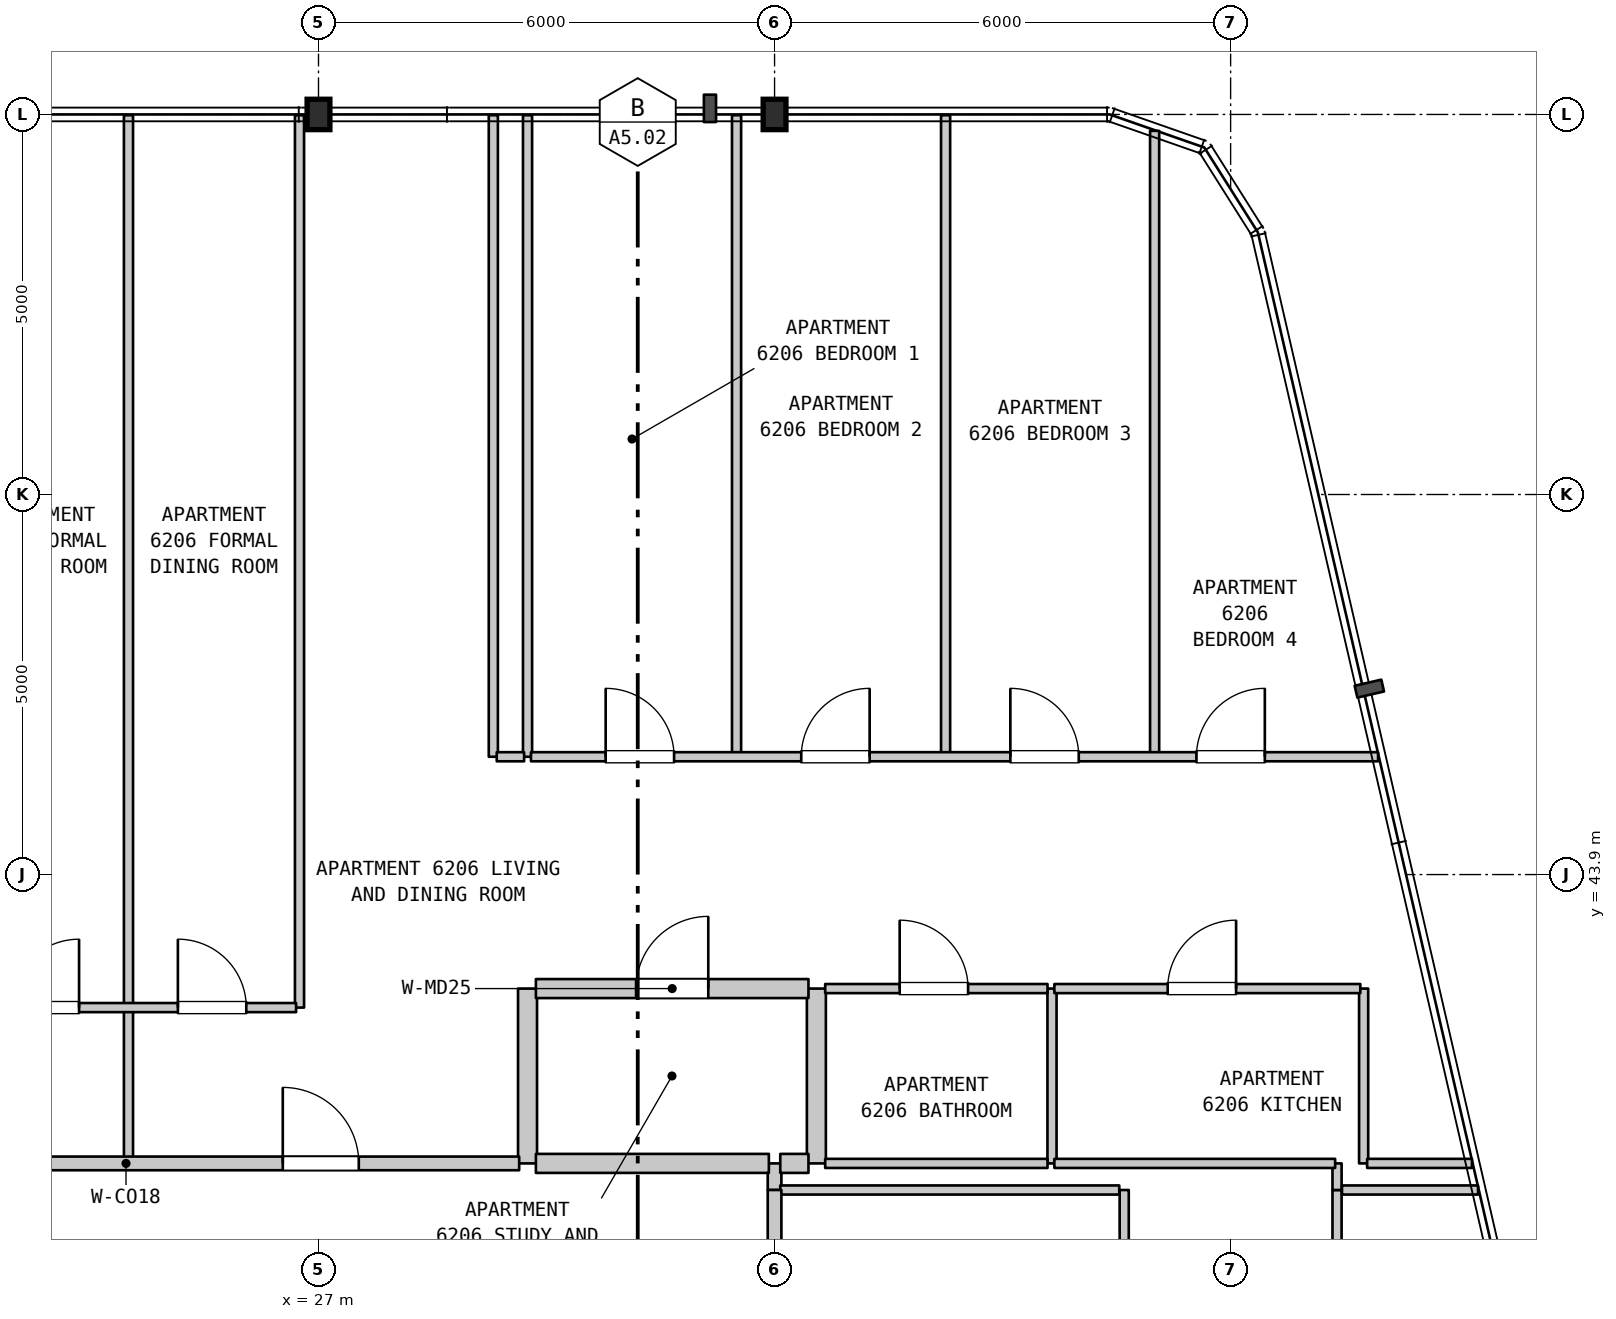
"""IFC4 building model, lengths in metres.
Left out: names, types, materials, properties, quantities, classifications, styles, units other than length and angle.
Written with IfcOpenShell. Run it as: python <this file> out.ifc"""

import sys

from ifc_helpers import new_model, si_unit, direction, frame, frame_2d, origin, origin_2d, place, context, subcontext, project, spatial, rectangle, i_section, extrude, element, fill, save


model = new_model("IFC4")
c1 = context("Model", 3, precision=1e-05, world=origin(), true_north=direction((0.0, 1.0)))
c2 = subcontext(c1, "Body", "Model", "MODEL_VIEW")
j1 = project(units=[si_unit("LENGTHUNIT", "METRE"), si_unit("PLANEANGLEUNIT", "RADIAN")], contexts=[c1])
p1 = place(None, origin())
s1 = spatial("IfcSite", under=j1, at=p1, CompositionType="ELEMENT")
p2 = place(p1, origin())
s2 = spatial("IfcBuilding", under=s1, at=p2, CompositionType="ELEMENT")
p3 = place(p2, frame((0.0, 0.0, 251.0)))
s3 = spatial("IfcBuildingStorey", under=s2, at=p3, CompositionType="ELEMENT", Elevation=251.0)
for number, where, z_axis, x_axis in (
    (1, (27.0, 53.9, 0.0), (0.0, 0.0, 1.0), (1.0, 0.0, 0.0)),
    (2, (33.0, 53.9, 0.0), (0.0, 0.0, 1.0), (1.0, 0.0, 0.0)),
):
    element("IfcColumn", number, at=place(p3, frame(where, z_axis=z_axis, x_axis=x_axis)), inside=s3, PredefinedType="COLUMN", context=c2, shape_type="SweptSolid", body=[
        extrude(i_section(OverallWidth=0.3, OverallDepth=0.4, WebThickness=0.013, FlangeThickness=0.024, FilletRadius=0.027, at=origin_2d()), origin(), (0.0, 0.0, 1.0), 3.7),
    ])
p4 = place(p3, frame((24.5, 40.1, 0.0), z_axis=(0.0, 0.0, 1.0), x_axis=(0.0, 1.0, 0.0)))
e3 = element("IfcWall", 3, at=p4, inside=s3, PredefinedType="PARTITIONING", context=c2, shape_type="SweptSolid", body=[
    extrude(rectangle(XDim=2.05, YDim=0.12, at=frame_2d((1.025, 0.0))), origin(), (0.0, 0.0, 1.0), 3.39),
])
for number, where, z_axis, x_axis in (
    (4, (24.5, 42.15, 0.0), (0.0, 0.0, 1.0), (0.0, 1.0, 0.0)),
    (5, (26.75, 42.15, 0.0), (0.0, 0.0, 1.0), (0.0, 1.0, 0.0)),
):
    element("IfcWall", number, at=place(p3, frame(where, z_axis=z_axis, x_axis=x_axis)), inside=s3, PredefinedType="PARTITIONING", context=c2, shape_type="SweptSolid", body=[
        extrude(rectangle(XDim=11.74, YDim=0.12, at=frame_2d((5.87, 0.0))), origin(), (0.0, 0.0, 1.0), 3.39),
    ])
p5 = place(p3, frame((29.3, 45.45, 0.0), z_axis=(0.0, 0.0, 1.0), x_axis=(0.0, 1.0, 0.0)))
e6 = element("IfcWall", 6, at=p5, inside=s3, PredefinedType="PARTITIONING", context=c2, shape_type="SweptSolid", body=[
    extrude(rectangle(XDim=8.44, YDim=0.12, at=frame_2d((4.22, 0.0))), origin(), (0.0, 0.0, 1.0), 3.39),
])
p6 = place(p3, frame((29.75, 40.1, 0.0), z_axis=(0.0, 0.0, 1.0), x_axis=(0.0, 1.0, 0.0)))
e7 = element("IfcWall", 7, at=p6, inside=s3, PredefinedType="STANDARD", context=c2, shape_type="SweptSolid", body=[
    extrude(rectangle(XDim=2.3, YDim=0.25, at=frame_2d((1.15, 0.0))), origin(), (0.0, 0.0, 1.0), 3.39),
])
for number, where, z_axis, x_axis in (
    (8, (29.75, 45.45, 0.0), (0.0, 0.0, 1.0), (0.0, 1.0, 0.0)),
    (9, (32.5, 45.45, 0.0), (0.0, 0.0, 1.0), (0.0, 1.0, 0.0)),
):
    element("IfcWall", number, at=place(p3, frame(where, z_axis=z_axis, x_axis=x_axis)), inside=s3, PredefinedType="PARTITIONING", context=c2, shape_type="SweptSolid", body=[
        extrude(rectangle(XDim=8.44, YDim=0.12, at=frame_2d((4.22, 0.0))), origin(), (0.0, 0.0, 1.0), 3.39),
    ])
p7 = place(p3, frame((33.0, 39.75, 0.0), z_axis=(0.0, 0.0, 1.0), x_axis=(0.0, 1.0, 0.0)))
e10 = element("IfcWall", 10, at=p7, inside=s3, PredefinedType="STANDARD", context=c2, shape_type="SweptSolid", body=[
    extrude(rectangle(XDim=0.35, YDim=0.18, at=frame_2d((0.175, 0.0))), origin(), (0.0, 0.0, 1.0), 3.39),
])
p8 = place(p3, frame((33.55, 40.1, 0.0), z_axis=(0.0, 0.0, 1.0), x_axis=(0.0, 1.0, 0.0)))
e11 = element("IfcWall", 11, at=p8, inside=s3, PredefinedType="STANDARD", context=c2, shape_type="SweptSolid", body=[
    extrude(rectangle(XDim=2.3, YDim=0.25, at=frame_2d((1.15, 0.0))), origin(), (0.0, 0.0, 1.0), 3.39),
])
p9 = place(p3, frame((35.25, 45.45, 0.0), z_axis=(0.0, 0.0, 1.0), x_axis=(0.0, 1.0, 0.0)))
e12 = element("IfcWall", 12, at=p9, inside=s3, PredefinedType="PARTITIONING", context=c2, shape_type="SweptSolid", body=[
    extrude(rectangle(XDim=8.44, YDim=0.12, at=frame_2d((4.22, 0.0))), origin(), (0.0, 0.0, 1.0), 3.39),
])
p10 = place(p3, frame((36.65, 40.1, 0.0), z_axis=(0.0, 0.0, 1.0), x_axis=(0.0, 1.0, 0.0)))
e13 = element("IfcWall", 13, at=p10, inside=s3, PredefinedType="PARTITIONING", context=c2, shape_type="SweptSolid", body=[
    extrude(rectangle(XDim=2.3, YDim=0.12, at=frame_2d((1.15, 0.0))), origin(), (0.0, 0.0, 1.0), 3.39),
])
p11 = place(p3, frame((37.6, 36.366, 0.0), z_axis=(0.0, 0.0, 1.0), x_axis=(0.0, 1.0, 0.0)))
e14 = element("IfcWall", 14, at=p11, inside=s3, PredefinedType="PARTITIONING", context=c2, shape_type="SweptSolid", body=[
    extrude(rectangle(XDim=3.384, YDim=0.12, at=frame_2d((1.692, 0.0))), origin(), (0.0, 0.0, 1.0), 3.39),
])
p12 = place(p11, frame((1.242, 0.0, 0.0)))
e15 = element("IfcOpeningElement", 15, at=p12, cuts=e14, PredefinedType="OPENING", context=c2, shape_type="SweptSolid", body=[
    extrude(rectangle(XDim=0.9, YDim=2.1, at=frame_2d((0.45, 1.05))), frame((0.0, 0.07, 0.0), z_axis=(0.0, -1.0, 0.0), x_axis=(1.0, 0.0, 0.0)), (0.0, 0.0, 1.0), 0.14),
])
p13 = place(p3, frame((38.0, 45.45, 0.0), z_axis=(0.0, 0.0, 1.0), x_axis=(0.0, 1.0, 0.0)))
e16 = element("IfcWall", 16, at=p13, inside=s3, PredefinedType="PARTITIONING", context=c2, shape_type="SweptSolid", body=[
    extrude(rectangle(XDim=8.234, YDim=0.12, at=frame_2d((4.117, 0.0))), origin(), (0.0, 0.0, 1.0), 3.39),
])
p14 = place(p3, frame((40.4, 32.7, 0.0), z_axis=(0.0, 0.0, 1.0), x_axis=(0.0, 1.0, 0.0)))
e17 = element("IfcWall", 17, at=p14, inside=s3, PredefinedType="PARTITIONING", context=c2, shape_type="SweptSolid", body=[
    extrude(rectangle(XDim=7.05, YDim=0.12, at=frame_2d((3.525, 0.0))), origin(), (0.0, 0.0, 1.0), 3.39),
])
p15 = place(p14, frame((3.004, 0.0, 0.0)))
e18 = element("IfcOpeningElement", 18, at=p15, cuts=e17, PredefinedType="OPENING", context=c2, shape_type="SweptSolid", body=[
    extrude(rectangle(XDim=0.9, YDim=2.15, at=frame_2d((0.45, 1.075))), frame((0.0, 0.07, 0.0), z_axis=(0.0, -1.0, 0.0), x_axis=(1.0, 0.0, 0.0)), (0.0, 0.0, 1.0), 0.14),
])
p16 = place(p3, frame((40.4, 39.75, 0.0), z_axis=(0.0, 0.0, 1.0), x_axis=(0.0, 1.0, 0.0)))
e19 = element("IfcWall", 19, at=p16, inside=s3, PredefinedType="PARTITIONING", context=c2, shape_type="SweptSolid", body=[
    extrude(rectangle(XDim=0.35, YDim=0.12, at=frame_2d((0.175, 0.0))), origin(), (0.0, 0.0, 1.0), 3.39),
])
p17 = place(p3, frame((40.75, 40.1, 0.0), z_axis=(0.0, 0.0, 1.0), x_axis=(0.0, 1.0, 0.0)))
e20 = element("IfcWall", 20, at=p17, inside=s3, PredefinedType="PARTITIONING", context=c2, shape_type="SweptSolid", body=[
    extrude(rectangle(XDim=2.3, YDim=0.12, at=frame_2d((1.15, 0.0))), origin(), (0.0, 0.0, 1.0), 3.39),
])
p18 = place(p3, frame((33.075, 39.75, 0.0), z_axis=(0.0, 0.0, 1.0), x_axis=(1.0, 0.0, 0.0)))
e21 = element("IfcWall", 21, at=p18, inside=s3, PredefinedType="PARTITIONING", context=c2, shape_type="SweptSolid", body=[
    extrude(rectangle(XDim=4.46, YDim=0.12, at=frame_2d((2.23, 0.0))), origin(), (0.0, 0.0, 1.0), 3.39),
])
p19 = place(p3, frame((40.465, 39.75, 0.0), z_axis=(0.0, 0.0, 1.0), x_axis=(1.0, 0.0, 0.0)))
e22 = element("IfcWall", 22, at=p19, inside=s3, PredefinedType="PARTITIONING", context=c2, shape_type="SweptSolid", body=[
    extrude(rectangle(XDim=1.79, YDim=0.12, at=frame_2d((0.895, 0.0))), origin(), (0.0, 0.0, 1.0), 3.39),
])
p20 = place(p3, frame((19.295, 40.1, 0.0), z_axis=(0.0, 0.0, 1.0), x_axis=(1.0, 0.0, 0.0)))
e23 = element("IfcWall", 23, at=p20, inside=s3, PredefinedType="STANDARD", context=c2, shape_type="SweptSolid", body=[
    extrude(rectangle(XDim=10.345, YDim=0.18, at=frame_2d((5.172, 0.0))), origin(), (0.0, 0.0, 1.0), 3.39),
])
p21 = place(p20, frame((2.035, 0.0, 0.0)))
e24 = element("IfcOpeningElement", 24, at=p21, cuts=e23, PredefinedType="OPENING", context=c2, shape_type="SweptSolid", body=[
    extrude(rectangle(XDim=1.0, YDim=2.15, at=frame_2d((0.5, 1.075))), frame((0.0, 0.1, 0.0), z_axis=(0.0, -1.0, 0.0), x_axis=(1.0, 0.0, 0.0)), (0.0, 0.0, 1.0), 0.2),
])
p22 = place(p20, frame((7.235, 0.0, 0.0)))
e25 = element("IfcOpeningElement", 25, at=p22, cuts=e23, PredefinedType="OPENING", context=c2, shape_type="SweptSolid", body=[
    extrude(rectangle(XDim=1.0, YDim=2.15, at=frame_2d((0.5, 1.075))), frame((0.0, 0.1, 0.0), z_axis=(0.0, -1.0, 0.0), x_axis=(1.0, 0.0, 0.0)), (0.0, 0.0, 1.0), 0.2),
])
p23 = place(p3, frame((29.86, 40.1, 0.0), z_axis=(0.0, 0.0, 1.0), x_axis=(1.0, 0.0, 0.0)))
e26 = element("IfcWall", 26, at=p23, inside=s3, PredefinedType="STANDARD", context=c2, shape_type="SweptSolid", body=[
    extrude(rectangle(XDim=3.065, YDim=0.25, at=frame_2d((1.532, 0.0))), origin(), (0.0, 0.0, 1.0), 3.39),
])
p24 = place(p3, frame((33.075, 40.1, 0.0), z_axis=(0.0, 0.0, 1.0), x_axis=(1.0, 0.0, 0.0)))
e27 = element("IfcWall", 27, at=p24, inside=s3, PredefinedType="STANDARD", context=c2, shape_type="SweptSolid", body=[
    extrude(rectangle(XDim=0.371, YDim=0.25, at=frame_2d((0.186, 0.0))), origin(), (0.0, 0.0, 1.0), 3.39),
])
p25 = place(p3, frame((33.666, 40.1, 0.0), z_axis=(0.0, 0.0, 1.0), x_axis=(1.0, 0.0, 0.0)))
e28 = element("IfcWall", 28, at=p25, inside=s3, PredefinedType="PARTITIONING", context=c2, shape_type="SweptSolid", body=[
    extrude(rectangle(XDim=2.925, YDim=0.12, at=frame_2d((1.462, 0.0))), origin(), (0.0, 0.0, 1.0), 3.39),
])
p26 = place(p3, frame((36.681, 40.1, 0.0), z_axis=(0.0, 0.0, 1.0), x_axis=(1.0, 0.0, 0.0)))
e29 = element("IfcWall", 29, at=p26, inside=s3, PredefinedType="PARTITIONING", context=c2, shape_type="SweptSolid", body=[
    extrude(rectangle(XDim=3.694, YDim=0.12, at=frame_2d((1.847, 0.0))), origin(), (0.0, 0.0, 1.0), 3.39),
])
p27 = place(p3, frame((40.796, 40.1, 0.0), z_axis=(0.0, 0.0, 1.0), x_axis=(1.0, 0.0, 0.0)))
e30 = element("IfcWall", 30, at=p27, inside=s3, PredefinedType="PARTITIONING", context=c2, shape_type="SweptSolid", body=[
    extrude(rectangle(XDim=1.379, YDim=0.12, at=frame_2d((0.689, 0.0))), origin(), (0.0, 0.0, 1.0), 3.39),
])
p28 = place(p3, frame((22.295, 42.15, 0.0), z_axis=(0.0, 0.0, 1.0), x_axis=(1.0, 0.0, 0.0)))
e31 = element("IfcWall", 31, at=p28, inside=s3, PredefinedType="PARTITIONING", context=c2, shape_type="SweptSolid", body=[
    extrude(rectangle(XDim=4.41, YDim=0.12, at=frame_2d((2.205, 0.0))), origin(), (0.0, 0.0, 1.0), 3.39),
])
p29 = place(p28, frame((0.655, 0.0, 0.0)))
e32 = element("IfcOpeningElement", 32, at=p29, cuts=e31, PredefinedType="OPENING", context=c2, shape_type="SweptSolid", body=[
    extrude(rectangle(XDim=0.9, YDim=2.15, at=frame_2d((0.45, 1.075))), frame((0.0, 0.07, 0.0), z_axis=(0.0, -1.0, 0.0), x_axis=(1.0, 0.0, 0.0)), (0.0, 0.0, 1.0), 0.14),
])
p30 = place(p28, frame((2.855, 0.0, 0.0)))
e33 = element("IfcOpeningElement", 33, at=p30, cuts=e31, PredefinedType="OPENING", context=c2, shape_type="SweptSolid", body=[
    extrude(rectangle(XDim=0.9, YDim=2.15, at=frame_2d((0.45, 1.075))), frame((0.0, 0.07, 0.0), z_axis=(0.0, -1.0, 0.0), x_axis=(1.0, 0.0, 0.0)), (0.0, 0.0, 1.0), 0.14),
])
p31 = place(p3, frame((29.86, 42.4, 0.0), z_axis=(0.0, 0.0, 1.0), x_axis=(1.0, 0.0, 0.0)))
e34 = element("IfcWall", 34, at=p31, inside=s3, PredefinedType="STANDARD", context=c2, shape_type="SweptSolid", body=[
    extrude(rectangle(XDim=3.586, YDim=0.25, at=frame_2d((1.793, 0.0))), origin(), (0.0, 0.0, 1.0), 3.39),
])
p32 = place(p31, frame((1.318, 0.0, 0.0)))
e35 = element("IfcOpeningElement", 35, at=p32, cuts=e34, PredefinedType="OPENING", context=c2, shape_type="SweptSolid", body=[
    extrude(rectangle(XDim=0.95, YDim=2.15, at=frame_2d((0.475, 1.075))), frame((0.0, 0.135, 0.0), z_axis=(0.0, -1.0, 0.0), x_axis=(1.0, 0.0, 0.0)), (0.0, 0.0, 1.0), 0.27),
])
p33 = place(p3, frame((33.666, 42.4, 0.0), z_axis=(0.0, 0.0, 1.0), x_axis=(1.0, 0.0, 0.0)))
e36 = element("IfcWall", 36, at=p33, inside=s3, PredefinedType="PARTITIONING", context=c2, shape_type="SweptSolid", body=[
    extrude(rectangle(XDim=2.925, YDim=0.12, at=frame_2d((1.462, 0.0))), origin(), (0.0, 0.0, 1.0), 3.39),
])
p34 = place(p33, frame((0.98, 0.0, 0.0)))
e37 = element("IfcOpeningElement", 37, at=p34, cuts=e36, PredefinedType="OPENING", context=c2, shape_type="SweptSolid", body=[
    extrude(rectangle(XDim=0.9, YDim=2.1, at=frame_2d((0.45, 1.05))), frame((0.0, 0.07, 0.0), z_axis=(0.0, -1.0, 0.0), x_axis=(1.0, 0.0, 0.0)), (0.0, 0.0, 1.0), 0.14),
])
p35 = place(p3, frame((36.681, 42.4, 0.0), z_axis=(0.0, 0.0, 1.0), x_axis=(1.0, 0.0, 0.0)))
e38 = element("IfcWall", 38, at=p35, inside=s3, PredefinedType="PARTITIONING", context=c2, shape_type="SweptSolid", body=[
    extrude(rectangle(XDim=4.025, YDim=0.12, at=frame_2d((2.013, 0.0))), origin(), (0.0, 0.0, 1.0), 3.39),
])
p36 = place(p35, frame((1.491, 0.0, 0.0)))
e39 = element("IfcOpeningElement", 39, at=p36, cuts=e38, PredefinedType="OPENING", context=c2, shape_type="SweptSolid", body=[
    extrude(rectangle(XDim=0.9, YDim=2.15, at=frame_2d((0.45, 1.075))), frame((0.0, 0.07, 0.0), z_axis=(0.0, -1.0, 0.0), x_axis=(1.0, 0.0, 0.0)), (0.0, 0.0, 1.0), 0.14),
])
p37 = place(p3, frame((29.345, 45.45, 0.0), z_axis=(0.0, 0.0, 1.0), x_axis=(1.0, 0.0, 0.0)))
e40 = element("IfcWall", 40, at=p37, inside=s3, PredefinedType="PARTITIONING", context=c2, shape_type="SweptSolid", body=[
    extrude(rectangle(XDim=0.36, YDim=0.12, at=frame_2d((0.18, 0.0))), origin(), (0.0, 0.0, 1.0), 3.39),
])
p38 = place(p3, frame((29.795, 45.45, 0.0), z_axis=(0.0, 0.0, 1.0), x_axis=(1.0, 0.0, 0.0)))
e41 = element("IfcWall", 41, at=p38, inside=s3, PredefinedType="PARTITIONING", context=c2, shape_type="SweptSolid", body=[
    extrude(rectangle(XDim=11.145, YDim=0.12, at=frame_2d((5.573, 0.0))), origin(), (0.0, 0.0, 1.0), 3.39),
])
p39 = place(p38, frame((0.983, 0.0, 0.0)))
e42 = element("IfcOpeningElement", 42, at=p39, cuts=e41, PredefinedType="OPENING", context=c2, shape_type="SweptSolid", body=[
    extrude(rectangle(XDim=0.9, YDim=2.15, at=frame_2d((0.45, 1.075))), frame((0.0, 0.07, 0.0), z_axis=(0.0, -1.0, 0.0), x_axis=(1.0, 0.0, 0.0)), (0.0, 0.0, 1.0), 0.14),
])
p40 = place(p38, frame((3.556, 0.0, 0.0)))
e43 = element("IfcOpeningElement", 43, at=p40, cuts=e41, PredefinedType="OPENING", context=c2, shape_type="SweptSolid", body=[
    extrude(rectangle(XDim=0.9, YDim=2.15, at=frame_2d((0.45, 1.075))), frame((0.0, 0.07, 0.0), z_axis=(0.0, -1.0, 0.0), x_axis=(1.0, 0.0, 0.0)), (0.0, 0.0, 1.0), 0.14),
])
p41 = place(p38, frame((6.307, 0.0, 0.0)))
e44 = element("IfcOpeningElement", 44, at=p41, cuts=e41, PredefinedType="OPENING", context=c2, shape_type="SweptSolid", body=[
    extrude(rectangle(XDim=0.9, YDim=2.15, at=frame_2d((0.45, 1.075))), frame((0.0, 0.07, 0.0), z_axis=(0.0, -1.0, 0.0), x_axis=(1.0, 0.0, 0.0)), (0.0, 0.0, 1.0), 0.14),
])
p42 = place(p38, frame((8.755, 0.0, 0.0)))
e45 = element("IfcOpeningElement", 45, at=p42, cuts=e41, PredefinedType="OPENING", context=c2, shape_type="SweptSolid", body=[
    extrude(rectangle(XDim=0.9, YDim=2.15, at=frame_2d((0.45, 1.075))), frame((0.0, 0.07, 0.0), z_axis=(0.0, -1.0, 0.0), x_axis=(1.0, 0.0, 0.0)), (0.0, 0.0, 1.0), 0.14),
])
p43 = place(p3, frame((33.0, 37.9, 0.0), z_axis=(0.0, 0.0, 1.0), x_axis=(0.0, 1.0, 0.0)))
e46 = element("IfcWall", 46, at=p43, inside=s3, PredefinedType="STANDARD", context=c2, shape_type="SweptSolid", body=[
    extrude(rectangle(XDim=1.85, YDim=0.18, at=frame_2d((0.925, 0.0))), origin(), (0.0, 0.0, 1.0), 2.79),
])
p44 = place(p22, origin())
e47 = element("IfcDoor", 47, at=p44, inside=s3, OperationType="SINGLE_SWING_LEFT", PredefinedType="DOOR", context=c2, shape_type="SweptSolid", body=[
    extrude(rectangle(XDim=1.0, YDim=2.15, at=frame_2d((0.5, 1.075))), frame((0.0, 0.025, 0.0), z_axis=(0.0, -1.0, 0.0), x_axis=(1.0, 0.0, 0.0)), (0.0, 0.0, 1.0), 0.05),
])
fill(e25, e47)
p45 = place(p29, origin())
e48 = element("IfcDoor", 48, at=p45, inside=s3, OperationType="SINGLE_SWING_RIGHT", PredefinedType="DOOR", context=c2, shape_type="SweptSolid", body=[
    extrude(rectangle(XDim=0.9, YDim=2.15, at=frame_2d((0.45, 1.075))), frame((0.0, 0.025, 0.0), z_axis=(0.0, -1.0, 0.0), x_axis=(1.0, 0.0, 0.0)), (0.0, 0.0, 1.0), 0.05),
])
fill(e32, e48)
p46 = place(p30, origin())
e49 = element("IfcDoor", 49, at=p46, inside=s3, OperationType="SINGLE_SWING_LEFT", PredefinedType="DOOR", context=c2, shape_type="SweptSolid", body=[
    extrude(rectangle(XDim=0.9, YDim=2.15, at=frame_2d((0.45, 1.075))), frame((0.0, 0.025, 0.0), z_axis=(0.0, -1.0, 0.0), x_axis=(1.0, 0.0, 0.0)), (0.0, 0.0, 1.0), 0.05),
])
fill(e33, e49)
p47 = place(p32, origin())
e50 = element("IfcDoor", 50, at=p47, inside=s3, OperationType="SINGLE_SWING_RIGHT", PredefinedType="DOOR", context=c2, shape_type="SweptSolid", body=[
    extrude(rectangle(XDim=0.95, YDim=2.15, at=frame_2d((0.475, 1.075))), frame((0.0, 0.025, 0.0), z_axis=(0.0, -1.0, 0.0), x_axis=(1.0, 0.0, 0.0)), (0.0, 0.0, 1.0), 0.05),
])
fill(e35, e50)
p48 = place(p34, origin())
e51 = element("IfcDoor", 51, at=p48, inside=s3, OperationType="SINGLE_SWING_LEFT", PredefinedType="DOOR", context=c2, shape_type="SweptSolid", body=[
    extrude(rectangle(XDim=0.9, YDim=2.1, at=frame_2d((0.45, 1.05))), frame((0.0, 0.025, 0.0), z_axis=(0.0, -1.0, 0.0), x_axis=(1.0, 0.0, 0.0)), (0.0, 0.0, 1.0), 0.05),
])
fill(e37, e51)
p49 = place(p36, origin())
e52 = element("IfcDoor", 52, at=p49, inside=s3, OperationType="SINGLE_SWING_RIGHT", PredefinedType="DOOR", context=c2, shape_type="SweptSolid", body=[
    extrude(rectangle(XDim=0.9, YDim=2.15, at=frame_2d((0.45, 1.075))), frame((0.0, 0.025, 0.0), z_axis=(0.0, -1.0, 0.0), x_axis=(1.0, 0.0, 0.0)), (0.0, 0.0, 1.0), 0.05),
])
fill(e39, e52)
p50 = place(p39, origin())
e53 = element("IfcDoor", 53, at=p50, inside=s3, OperationType="SINGLE_SWING_LEFT", PredefinedType="DOOR", context=c2, shape_type="SweptSolid", body=[
    extrude(rectangle(XDim=0.9, YDim=2.15, at=frame_2d((0.45, 1.075))), frame((0.0, 0.025, 0.0), z_axis=(0.0, -1.0, 0.0), x_axis=(1.0, 0.0, 0.0)), (0.0, 0.0, 1.0), 0.05),
])
fill(e42, e53)
p51 = place(p40, origin())
e54 = element("IfcDoor", 54, at=p51, inside=s3, OperationType="SINGLE_SWING_RIGHT", PredefinedType="DOOR", context=c2, shape_type="SweptSolid", body=[
    extrude(rectangle(XDim=0.9, YDim=2.15, at=frame_2d((0.45, 1.075))), frame((0.0, 0.025, 0.0), z_axis=(0.0, -1.0, 0.0), x_axis=(1.0, 0.0, 0.0)), (0.0, 0.0, 1.0), 0.05),
])
fill(e43, e54)
p52 = place(p41, origin())
e55 = element("IfcDoor", 55, at=p52, inside=s3, OperationType="SINGLE_SWING_LEFT", PredefinedType="DOOR", context=c2, shape_type="SweptSolid", body=[
    extrude(rectangle(XDim=0.9, YDim=2.15, at=frame_2d((0.45, 1.075))), frame((0.0, 0.025, 0.0), z_axis=(0.0, -1.0, 0.0), x_axis=(1.0, 0.0, 0.0)), (0.0, 0.0, 1.0), 0.05),
])
fill(e44, e55)
p53 = place(p42, origin())
e56 = element("IfcDoor", 56, at=p53, inside=s3, OperationType="SINGLE_SWING_RIGHT", PredefinedType="DOOR", context=c2, shape_type="SweptSolid", body=[
    extrude(rectangle(XDim=0.9, YDim=2.15, at=frame_2d((0.45, 1.075))), frame((0.0, 0.025, 0.0), z_axis=(0.0, -1.0, 0.0), x_axis=(1.0, 0.0, 0.0)), (0.0, 0.0, 1.0), 0.05),
])
fill(e45, e56)
save(model, sys.argv[1])
